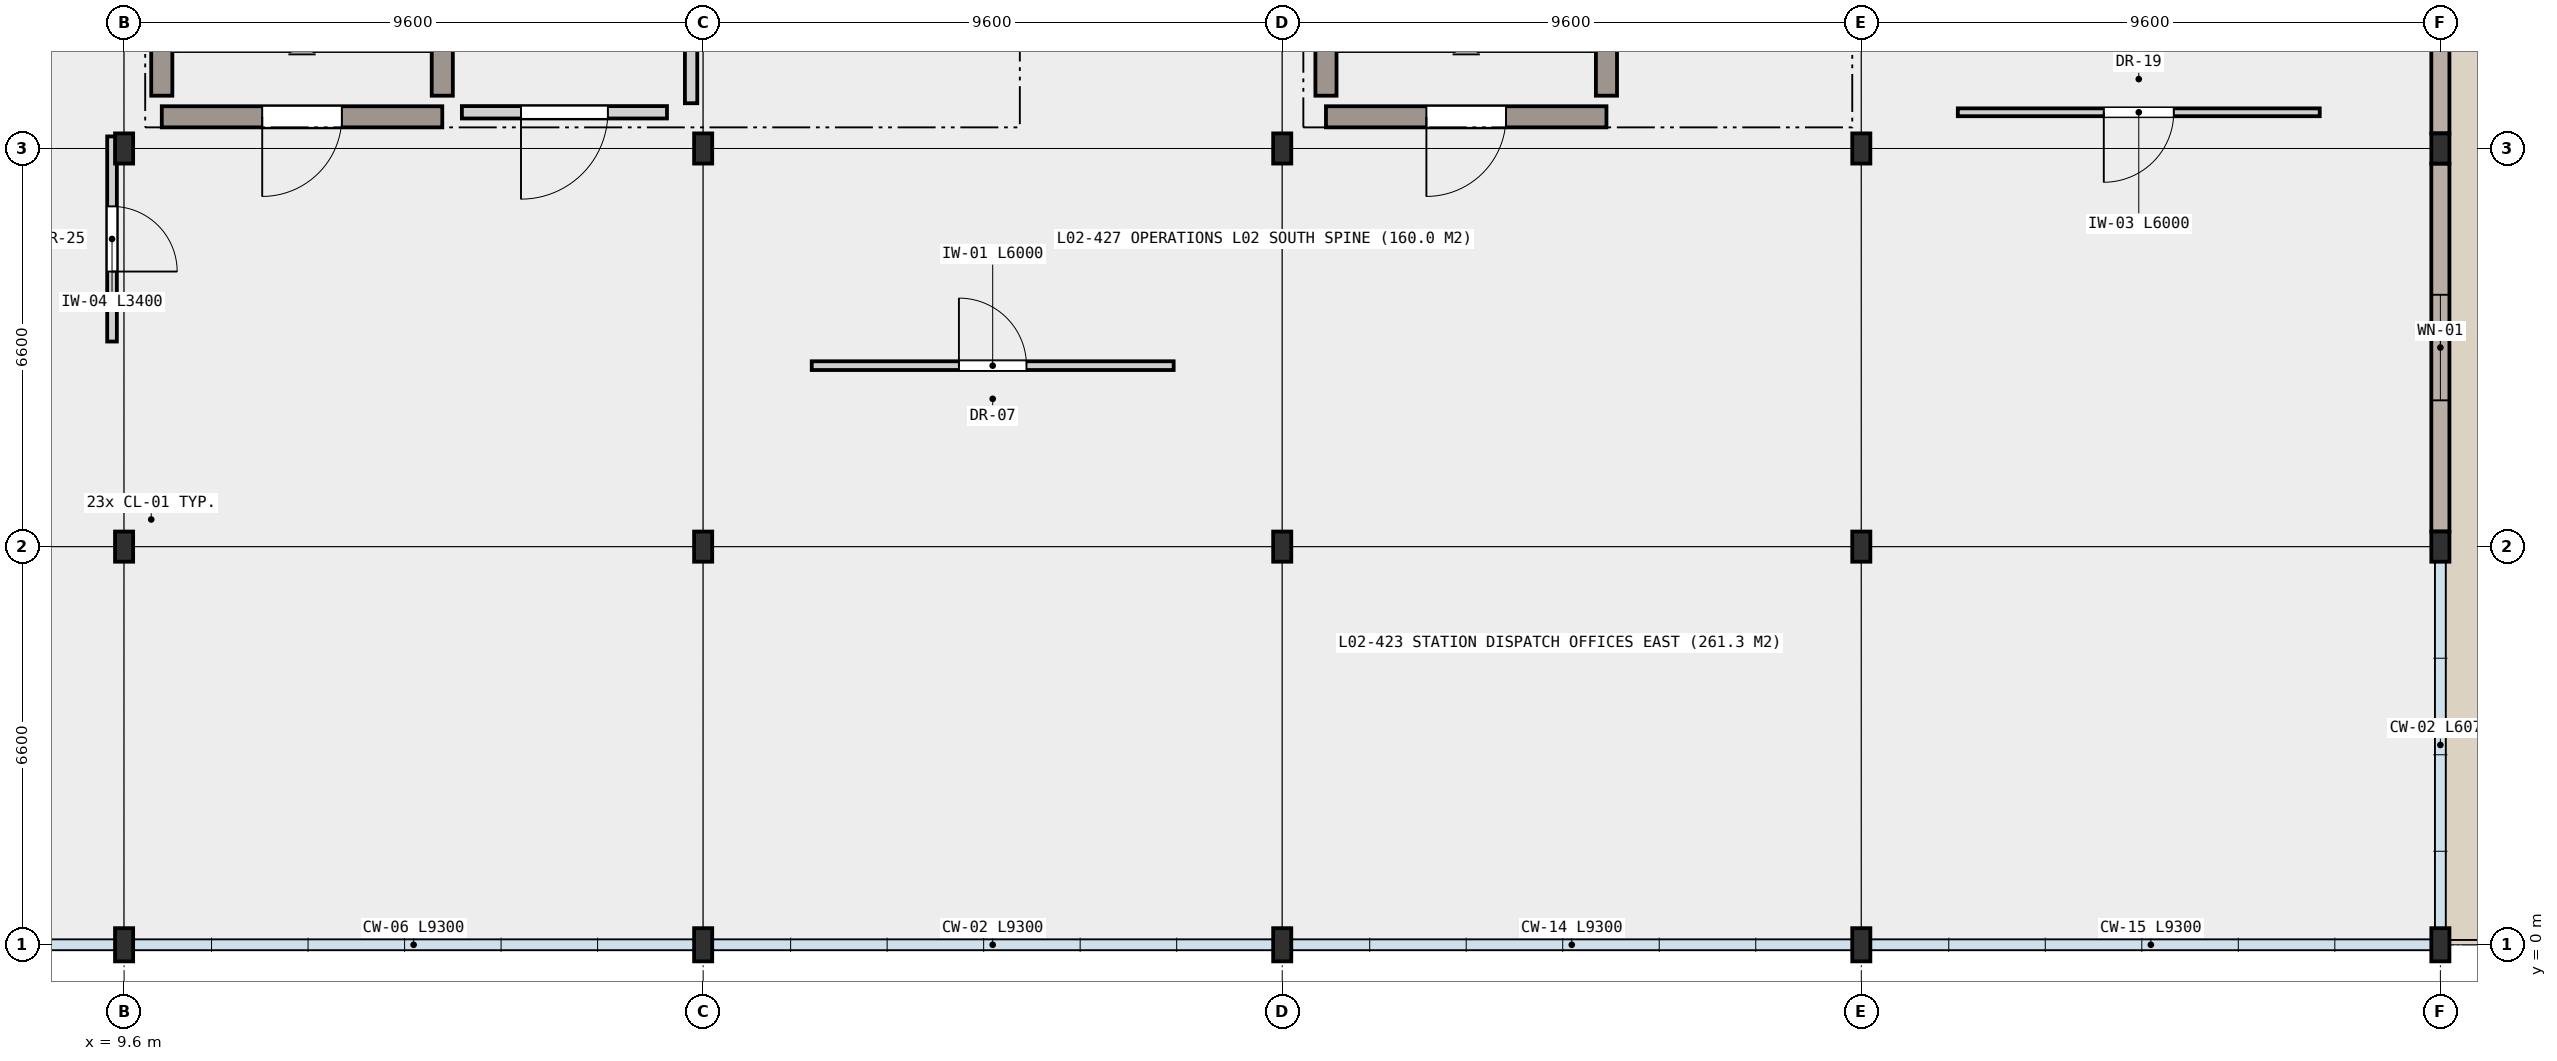
"""IFC4 building model, lengths in metres.
Left out: names, types, materials, properties, quantities, classifications, styles, units other than length and angle.
Written with IfcOpenShell. Run it as: python <this file> out.ifc"""

import sys

from ifc_helpers import new_model, si_unit, direction, frame, frame_2d, origin, origin_2d, place, context, subcontext, project, spatial, rectangle, i_section, extrude, element, fill, save


model = new_model("IFC4")
c1 = context("Model", 3, precision=1e-05, world=origin(), true_north=direction((0.0, 1.0)))
c2 = subcontext(c1, "Body", "Model", "MODEL_VIEW")
j1 = project(units=[si_unit("LENGTHUNIT", "METRE"), si_unit("PLANEANGLEUNIT", "RADIAN")], contexts=[c1])
p1 = place(None, origin())
s1 = spatial("IfcSite", under=j1, at=p1, CompositionType="ELEMENT")
p2 = place(p1, origin())
s2 = spatial("IfcBuilding", under=s1, at=p2, CompositionType="ELEMENT")
p3 = place(p2, frame((0.0, 0.0, 10.2)))
s3 = spatial("IfcBuildingStorey", under=s2, at=p3, CompositionType="ELEMENT", Elevation=10.2)
p4 = place(p3, frame((9.6, 0.0, 0.0), z_axis=(0.0, 0.0, 1.0), x_axis=(1.0, 0.0, 0.0)))
e1 = element("IfcColumn", 1, at=p4, inside=s3, PredefinedType="COLUMN", context=c2, shape_type="SweptSolid", body=[
    extrude(i_section(OverallWidth=0.3, OverallDepth=0.55, WebThickness=0.015, FlangeThickness=0.029, FilletRadius=0.027, at=origin_2d()), origin(), (0.0, 0.0, 1.0), 4.2),
])
for number, where, z_axis, x_axis in (
    (2, (9.6, 6.6, 0.0), (0.0, 0.0, 1.0), (1.0, 0.0, 0.0)),
    (3, (9.6, 13.2, 0.0), (0.0, 0.0, 1.0), (1.0, 0.0, 0.0)),
):
    element("IfcColumn", number, at=place(p3, frame(where, z_axis=z_axis, x_axis=x_axis)), inside=s3, PredefinedType="COLUMN", context=c2, shape_type="SweptSolid", body=[
        extrude(i_section(OverallWidth=0.3, OverallDepth=0.5, WebThickness=0.014, FlangeThickness=0.028, FilletRadius=0.027, at=origin_2d()), origin(), (0.0, 0.0, 1.0), 4.2),
    ])
p5 = place(p3, frame((19.2, 0.0, 0.0), z_axis=(0.0, 0.0, 1.0), x_axis=(1.0, 0.0, 0.0)))
e4 = element("IfcColumn", 4, at=p5, inside=s3, PredefinedType="COLUMN", context=c2, shape_type="SweptSolid", body=[
    extrude(i_section(OverallWidth=0.3, OverallDepth=0.55, WebThickness=0.015, FlangeThickness=0.029, FilletRadius=0.027, at=origin_2d()), origin(), (0.0, 0.0, 1.0), 4.2),
])
for number, where, z_axis, x_axis in (
    (5, (19.2, 6.6, 0.0), (0.0, 0.0, 1.0), (1.0, 0.0, 0.0)),
    (6, (19.2, 13.2, 0.0), (0.0, 0.0, 1.0), (1.0, 0.0, 0.0)),
):
    element("IfcColumn", number, at=place(p3, frame(where, z_axis=z_axis, x_axis=x_axis)), inside=s3, PredefinedType="COLUMN", context=c2, shape_type="SweptSolid", body=[
        extrude(i_section(OverallWidth=0.3, OverallDepth=0.5, WebThickness=0.014, FlangeThickness=0.028, FilletRadius=0.027, at=origin_2d()), origin(), (0.0, 0.0, 1.0), 4.2),
    ])
p6 = place(p3, frame((28.8, 0.0, 0.0), z_axis=(0.0, 0.0, 1.0), x_axis=(1.0, 0.0, 0.0)))
e7 = element("IfcColumn", 7, at=p6, inside=s3, PredefinedType="COLUMN", context=c2, shape_type="SweptSolid", body=[
    extrude(i_section(OverallWidth=0.3, OverallDepth=0.55, WebThickness=0.015, FlangeThickness=0.029, FilletRadius=0.027, at=origin_2d()), origin(), (0.0, 0.0, 1.0), 4.2),
])
for number, where, z_axis, x_axis in (
    (8, (28.8, 6.6, 0.0), (0.0, 0.0, 1.0), (1.0, 0.0, 0.0)),
    (9, (28.8, 13.2, 0.0), (0.0, 0.0, 1.0), (1.0, 0.0, 0.0)),
):
    element("IfcColumn", number, at=place(p3, frame(where, z_axis=z_axis, x_axis=x_axis)), inside=s3, PredefinedType="COLUMN", context=c2, shape_type="SweptSolid", body=[
        extrude(i_section(OverallWidth=0.3, OverallDepth=0.5, WebThickness=0.014, FlangeThickness=0.028, FilletRadius=0.027, at=origin_2d()), origin(), (0.0, 0.0, 1.0), 4.2),
    ])
p7 = place(p3, frame((38.4, 0.0, 0.0), z_axis=(0.0, 0.0, 1.0), x_axis=(1.0, 0.0, 0.0)))
e10 = element("IfcColumn", 10, at=p7, inside=s3, PredefinedType="COLUMN", context=c2, shape_type="SweptSolid", body=[
    extrude(i_section(OverallWidth=0.3, OverallDepth=0.55, WebThickness=0.015, FlangeThickness=0.029, FilletRadius=0.027, at=origin_2d()), origin(), (0.0, 0.0, 1.0), 4.2),
])
for number, where, z_axis, x_axis in (
    (11, (38.4, 6.6, 0.0), (0.0, 0.0, 1.0), (1.0, 0.0, 0.0)),
    (12, (38.4, 13.2, 0.0), (0.0, 0.0, 1.0), (1.0, 0.0, 0.0)),
):
    element("IfcColumn", number, at=place(p3, frame(where, z_axis=z_axis, x_axis=x_axis)), inside=s3, PredefinedType="COLUMN", context=c2, shape_type="SweptSolid", body=[
        extrude(i_section(OverallWidth=0.3, OverallDepth=0.5, WebThickness=0.014, FlangeThickness=0.028, FilletRadius=0.027, at=origin_2d()), origin(), (0.0, 0.0, 1.0), 4.2),
    ])
p8 = place(p3, frame((48.0, 0.0, 0.0), z_axis=(0.0, 0.0, 1.0), x_axis=(1.0, 0.0, 0.0)))
e13 = element("IfcColumn", 13, at=p8, inside=s3, PredefinedType="COLUMN", context=c2, shape_type="SweptSolid", body=[
    extrude(i_section(OverallWidth=0.3, OverallDepth=0.55, WebThickness=0.015, FlangeThickness=0.029, FilletRadius=0.027, at=origin_2d()), origin(), (0.0, 0.0, 1.0), 4.2),
])
for number, where, z_axis, x_axis in (
    (14, (48.0, 6.6, 0.0), (0.0, 0.0, 1.0), (1.0, 0.0, 0.0)),
    (15, (48.0, 13.2, 0.0), (0.0, 0.0, 1.0), (1.0, 0.0, 0.0)),
):
    element("IfcColumn", number, at=place(p3, frame(where, z_axis=z_axis, x_axis=x_axis)), inside=s3, PredefinedType="COLUMN", context=c2, shape_type="SweptSolid", body=[
        extrude(i_section(OverallWidth=0.3, OverallDepth=0.5, WebThickness=0.014, FlangeThickness=0.028, FilletRadius=0.027, at=origin_2d()), origin(), (0.0, 0.0, 1.0), 4.2),
    ])
p9 = place(p3, frame((48.0, 21.95, 0.0), z_axis=(0.0, 0.0, 1.0), x_axis=(0.0, -1.0, 0.0)))
e16 = element("IfcWall", 16, at=p9, inside=s3, PredefinedType="SOLIDWALL", context=c2, shape_type="SweptSolid", body=[
    extrude(rectangle(XDim=8.5, YDim=0.3, at=frame_2d((4.25, 0.0))), origin(), (0.0, 0.0, 1.0), 3.37),
])
p10 = place(p9, frame((3.425, 0.0, 0.0)))
e17 = element("IfcOpeningElement", 17, at=p10, cuts=e16, PredefinedType="OPENING", context=c2, shape_type="SweptSolid", body=[
    extrude(rectangle(XDim=1.65, YDim=2.25, at=frame_2d((0.825, 1.125))), frame((0.0, 0.16, 0.0), z_axis=(0.0, -1.0, 0.0), x_axis=(1.0, 0.0, 0.0)), (0.0, 0.0, 1.0), 0.32),
])
p11 = place(p3, frame((48.0, 12.95, 0.0), z_axis=(0.0, 0.0, 1.0), x_axis=(0.0, -1.0, 0.0)))
e18 = element("IfcWall", 18, at=p11, inside=s3, PredefinedType="SOLIDWALL", context=c2, shape_type="SweptSolid", body=[
    extrude(rectangle(XDim=6.1, YDim=0.3, at=frame_2d((3.05, 0.0))), origin(), (0.0, 0.0, 1.0), 3.42),
])
p12 = place(p11, frame((2.175, 0.0, 0.85)))
e19 = element("IfcOpeningElement", 19, at=p12, cuts=e18, PredefinedType="OPENING", context=c2, shape_type="SweptSolid", body=[
    extrude(rectangle(XDim=1.75, YDim=2.15, at=frame_2d((0.875, 1.075))), frame((0.0, 0.16, 0.0), z_axis=(0.0, -1.0, 0.0), x_axis=(1.0, 0.0, 0.0)), (0.0, 0.0, 1.0), 0.32),
])
p13 = place(p3, frame((14.875, 13.725, 0.0), z_axis=(0.0, 0.0, 1.0), x_axis=(-1.0, 0.0, 0.0)))
e20 = element("IfcWall", 20, at=p13, inside=s3, PredefinedType="SHEAR", context=c2, shape_type="SweptSolid", body=[
    extrude(rectangle(XDim=4.65, YDim=0.35, at=frame_2d((2.325, 0.0))), origin(), (0.0, 0.0, 1.0), 3.95),
])
p14 = place(p13, frame((1.665, 0.0, 0.0)))
e21 = element("IfcOpeningElement", 21, at=p14, cuts=e20, PredefinedType="OPENING", context=c2, shape_type="SweptSolid", body=[
    extrude(rectangle(XDim=1.32, YDim=2.15, at=frame_2d((0.66, 1.075))), frame((0.0, 0.185, 0.0), z_axis=(0.0, -1.0, 0.0), x_axis=(1.0, 0.0, 0.0)), (0.0, 0.0, 1.0), 0.37),
])
for number, where, z_axis, x_axis in (
    (22, (10.225, 14.075, 0.0), (0.0, 0.0, 1.0), (0.0, 1.0, 0.0)),
    (23, (14.875, 21.125, 0.0), (0.0, 0.0, 1.0), (0.0, -1.0, 0.0)),
):
    element("IfcWall", number, at=place(p3, frame(where, z_axis=z_axis, x_axis=x_axis)), inside=s3, PredefinedType="SHEAR", context=c2, shape_type="SweptSolid", body=[
        extrude(rectangle(XDim=7.05, YDim=0.35, at=frame_2d((3.525, 0.0))), origin(), (0.0, 0.0, 1.0), 3.95),
    ])
p15 = place(p3, frame((34.175, 13.725, 0.0), z_axis=(0.0, 0.0, 1.0), x_axis=(-1.0, 0.0, 0.0)))
e24 = element("IfcWall", 24, at=p15, inside=s3, PredefinedType="SHEAR", context=c2, shape_type="SweptSolid", body=[
    extrude(rectangle(XDim=4.65, YDim=0.35, at=frame_2d((2.325, 0.0))), origin(), (0.0, 0.0, 1.0), 3.95),
])
p16 = place(p15, frame((1.665, 0.0, 0.0)))
e25 = element("IfcOpeningElement", 25, at=p16, cuts=e24, PredefinedType="OPENING", context=c2, shape_type="SweptSolid", body=[
    extrude(rectangle(XDim=1.32, YDim=2.15, at=frame_2d((0.66, 1.075))), frame((0.0, 0.185, 0.0), z_axis=(0.0, -1.0, 0.0), x_axis=(1.0, 0.0, 0.0)), (0.0, 0.0, 1.0), 0.37),
])
for number, where, z_axis, x_axis in (
    (26, (29.525, 14.075, 0.0), (0.0, 0.0, 1.0), (0.0, 1.0, 0.0)),
    (27, (34.175, 21.125, 0.0), (0.0, 0.0, 1.0), (0.0, -1.0, 0.0)),
):
    element("IfcWall", number, at=place(p3, frame(where, z_axis=z_axis, x_axis=x_axis)), inside=s3, PredefinedType="SHEAR", context=c2, shape_type="SweptSolid", body=[
        extrude(rectangle(XDim=7.05, YDim=0.35, at=frame_2d((3.525, 0.0))), origin(), (0.0, 0.0, 1.0), 3.95),
    ])
p17 = place(p3, frame((18.6, 13.8, 0.0), z_axis=(0.0, 0.0, 1.0), x_axis=(-1.0, 0.0, 0.0)))
e28 = element("IfcWall", 28, at=p17, inside=s3, PredefinedType="PARTITIONING", context=c2, shape_type="SweptSolid", body=[
    extrude(rectangle(XDim=3.4, YDim=0.205, at=frame_2d((1.7, 0.0))), origin(), (0.0, 0.0, 1.0), 3.95),
])
p18 = place(p17, frame((0.98, 0.0, 0.0)))
e29 = element("IfcOpeningElement", 29, at=p18, cuts=e28, PredefinedType="OPENING", context=c2, shape_type="SweptSolid", body=[
    extrude(rectangle(XDim=1.44, YDim=2.18, at=frame_2d((0.72, 1.09))), frame((0.0, 0.113, 0.0), z_axis=(0.0, -1.0, 0.0), x_axis=(1.0, 0.0, 0.0)), (0.0, 0.0, 1.0), 0.225),
])
p19 = place(p3, frame((19.0, 18.45, 0.0), z_axis=(0.0, 0.0, 1.0), x_axis=(0.0, -1.0, 0.0)))
e30 = element("IfcWall", 30, at=p19, inside=s3, PredefinedType="PARTITIONING", context=c2, shape_type="SweptSolid", body=[
    extrude(rectangle(XDim=4.5, YDim=0.205, at=frame_2d((2.25, 0.0))), origin(), (0.0, 0.0, 1.0), 3.37),
])
p20 = place(p3, frame((9.4, 13.4, 0.0), z_axis=(0.0, 0.0, 1.0), x_axis=(0.0, -1.0, 0.0)))
e31 = element("IfcWall", 31, at=p20, inside=s3, PredefinedType="PARTITIONING", context=c2, shape_type="SweptSolid", body=[
    extrude(rectangle(XDim=3.4, YDim=0.16, at=frame_2d((1.7, 0.0))), origin(), (0.0, 0.0, 1.0), 3.42),
])
p21 = place(p20, frame((1.16, 0.0, 0.0)))
e32 = element("IfcOpeningElement", 32, at=p21, cuts=e31, PredefinedType="OPENING", context=c2, shape_type="SweptSolid", body=[
    extrude(rectangle(XDim=1.08, YDim=2.12, at=frame_2d((0.54, 1.06))), frame((0.0, 0.09, 0.0), z_axis=(0.0, -1.0, 0.0), x_axis=(1.0, 0.0, 0.0)), (0.0, 0.0, 1.0), 0.18),
])
p22 = place(p3, frame((21.0, 9.6, 0.0), z_axis=(0.0, 0.0, 1.0), x_axis=(1.0, 0.0, 0.0)))
e33 = element("IfcWall", 33, at=p22, inside=s3, PredefinedType="PARTITIONING", context=c2, shape_type="SweptSolid", body=[
    extrude(rectangle(XDim=6.0, YDim=0.145, at=frame_2d((3.0, 0.0))), origin(), (0.0, 0.0, 1.0), 3.95),
])
p23 = place(p22, frame((2.44, 0.0, 0.0)))
e34 = element("IfcOpeningElement", 34, at=p23, cuts=e33, PredefinedType="OPENING", context=c2, shape_type="SweptSolid", body=[
    extrude(rectangle(XDim=1.12, YDim=2.15, at=frame_2d((0.56, 1.075))), frame((0.0, 0.083, 0.0), z_axis=(0.0, -1.0, 0.0), x_axis=(1.0, 0.0, 0.0)), (0.0, 0.0, 1.0), 0.165),
])
p24 = place(p3, frame((46.0, 13.8, 0.0), z_axis=(0.0, 0.0, 1.0), x_axis=(-1.0, 0.0, 0.0)))
e35 = element("IfcWall", 35, at=p24, inside=s3, PredefinedType="PARTITIONING", context=c2, shape_type="SweptSolid", body=[
    extrude(rectangle(XDim=6.0, YDim=0.13, at=frame_2d((3.0, 0.0))), origin(), (0.0, 0.0, 1.0), 3.95),
])
p25 = place(p24, frame((2.42, 0.0, 0.0)))
e36 = element("IfcOpeningElement", 36, at=p25, cuts=e35, PredefinedType="OPENING", context=c2, shape_type="SweptSolid", body=[
    extrude(rectangle(XDim=1.16, YDim=2.15, at=frame_2d((0.58, 1.075))), frame((0.0, 0.075, 0.0), z_axis=(0.0, -1.0, 0.0), x_axis=(1.0, 0.0, 0.0)), (0.0, 0.0, 1.0), 0.15),
])
p26 = place(p12, origin())
e37 = element("IfcWindow", 37, at=p26, inside=s3, PartitioningType="SINGLE_PANEL", PredefinedType="WINDOW", context=c2, shape_type="SweptSolid", body=[
    extrude(rectangle(XDim=1.75, YDim=2.15, at=frame_2d((0.875, 1.075))), frame((0.0, 0.03, 0.0), z_axis=(0.0, -1.0, 0.0), x_axis=(1.0, 0.0, 0.0)), (0.0, 0.0, 1.0), 0.06),
])
fill(e19, e37)
p27 = place(p14, origin())
e38 = element("IfcDoor", 38, at=p27, inside=s3, OperationType="SINGLE_SWING_RIGHT", PredefinedType="DOOR", context=c2, shape_type="SweptSolid", body=[
    extrude(rectangle(XDim=1.32, YDim=2.15, at=frame_2d((0.66, 1.075))), frame((0.0, 0.025, 0.0), z_axis=(0.0, -1.0, 0.0), x_axis=(1.0, 0.0, 0.0)), (0.0, 0.0, 1.0), 0.05),
])
fill(e21, e38)
p28 = place(p16, origin())
e39 = element("IfcDoor", 39, at=p28, inside=s3, OperationType="SINGLE_SWING_RIGHT", PredefinedType="DOOR", context=c2, shape_type="SweptSolid", body=[
    extrude(rectangle(XDim=1.32, YDim=2.15, at=frame_2d((0.66, 1.075))), frame((0.0, 0.025, 0.0), z_axis=(0.0, -1.0, 0.0), x_axis=(1.0, 0.0, 0.0)), (0.0, 0.0, 1.0), 0.05),
])
fill(e25, e39)
p29 = place(p18, origin())
e40 = element("IfcDoor", 40, at=p29, inside=s3, OperationType="SINGLE_SWING_RIGHT", PredefinedType="DOOR", context=c2, shape_type="SweptSolid", body=[
    extrude(rectangle(XDim=1.44, YDim=2.18, at=frame_2d((0.72, 1.09))), frame((0.0, 0.025, 0.0), z_axis=(0.0, -1.0, 0.0), x_axis=(1.0, 0.0, 0.0)), (0.0, 0.0, 1.0), 0.05),
])
fill(e29, e40)
p30 = place(p21, origin())
e41 = element("IfcDoor", 41, at=p30, inside=s3, OperationType="SINGLE_SWING_RIGHT", PredefinedType="DOOR", context=c2, shape_type="SweptSolid", body=[
    extrude(rectangle(XDim=1.08, YDim=2.12, at=frame_2d((0.54, 1.06))), frame((0.0, 0.025, 0.0), z_axis=(0.0, -1.0, 0.0), x_axis=(1.0, 0.0, 0.0)), (0.0, 0.0, 1.0), 0.05),
])
fill(e32, e41)
p31 = place(p23, origin())
e42 = element("IfcDoor", 42, at=p31, inside=s3, OperationType="SINGLE_SWING_LEFT", PredefinedType="DOOR", context=c2, shape_type="SweptSolid", body=[
    extrude(rectangle(XDim=1.12, YDim=2.15, at=frame_2d((0.56, 1.075))), frame((0.0, 0.025, 0.0), z_axis=(0.0, -1.0, 0.0), x_axis=(1.0, 0.0, 0.0)), (0.0, 0.0, 1.0), 0.05),
])
fill(e34, e42)
p32 = place(p25, origin())
e43 = element("IfcDoor", 43, at=p32, inside=s3, OperationType="SINGLE_SWING_RIGHT", PredefinedType="DOOR", context=c2, shape_type="SweptSolid", body=[
    extrude(rectangle(XDim=1.16, YDim=2.15, at=frame_2d((0.58, 1.075))), frame((0.0, 0.025, 0.0), z_axis=(0.0, -1.0, 0.0), x_axis=(1.0, 0.0, 0.0)), (0.0, 0.0, 1.0), 0.05),
])
fill(e36, e43)
save(model, sys.argv[1])
